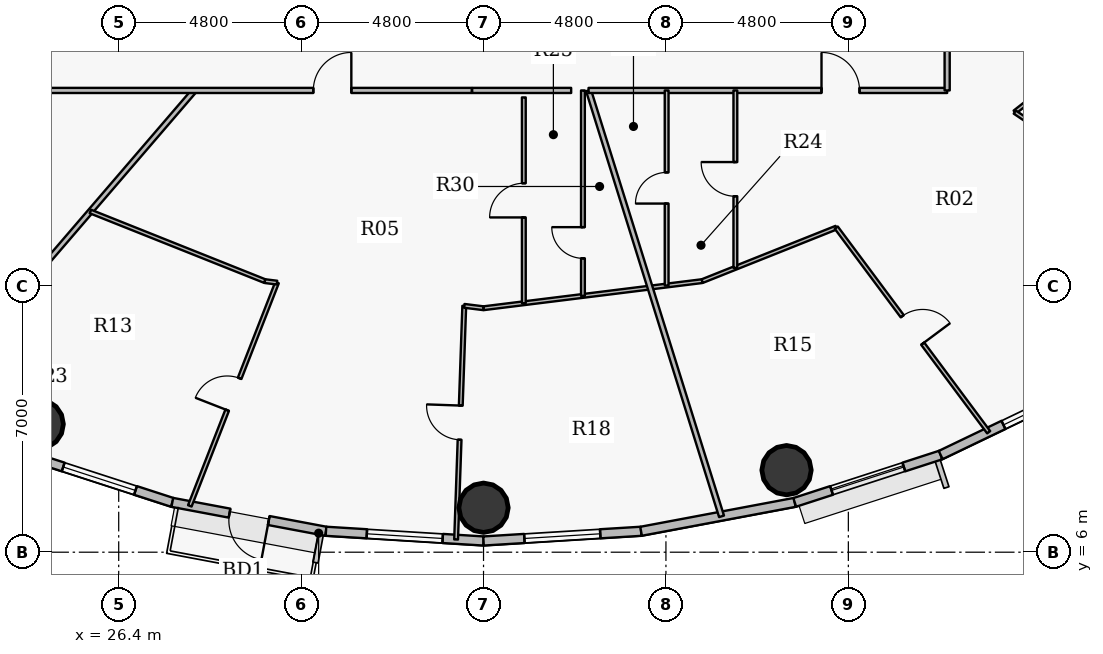
"""IFC4 building model, lengths in metres.
Left out: names, types, materials, properties, quantities, classifications, styles, units other than length and angle.
Written with IfcOpenShell. Run it as: python <this file> out.ifc"""

import sys

from ifc_helpers import new_model, si_unit, direction, frame, frame_2d, origin, origin_2d, place, context, subcontext, project, spatial, rectangle, hollow_circle, extrude, source, transform, mapped, element, fill, save


model = new_model("IFC4")
c1 = context("Model", 3, precision=1e-05, world=origin(), true_north=direction((0.0, 1.0)))
c2 = subcontext(c1, "Body", "Model", "MODEL_VIEW")
j1 = project(units=[si_unit("LENGTHUNIT", "METRE"), si_unit("PLANEANGLEUNIT", "RADIAN")], contexts=[c1])
p1 = place(None, origin())
s1 = spatial("IfcSite", under=j1, at=p1, CompositionType="ELEMENT")
p2 = place(p1, origin())
s2 = spatial("IfcBuilding", under=s1, at=p2, CompositionType="ELEMENT")
p3 = place(p2, frame((0.0, 0.0, 182.4)))
s3 = spatial("IfcBuildingStorey", under=s2, at=p3, CompositionType="ELEMENT", Elevation=182.4)
for number, where, z_axis, x_axis in (
    (1, (24.294, 9.369, 0.0), (0.0, 0.0, 1.0), (1.0, 0.0, 0.0)),
    (2, (36.0, 7.17, 0.0), (0.0, 0.0, 1.0), (1.0, 0.0, 0.0)),
    (3, (43.973, 8.159, 0.0), (0.0, 0.0, 1.0), (1.0, 0.0, 0.0)),
):
    element("IfcColumn", number, at=place(p3, frame(where, z_axis=z_axis, x_axis=x_axis)), inside=s3, PredefinedType="COLUMN", context=c2, shape_type="SweptSolid", body=[
        extrude(hollow_circle(Radius=0.65, WallThickness=0.04, at=origin_2d()), origin(), (0.0, 0.0, 1.0), 3.75),
    ])
p4 = place(p3, frame((27.811, 7.311, 0.0), z_axis=(0.0, 0.0, 1.0), x_axis=(-0.951209870236, 0.30854462038, 0.0)))
e4 = element("IfcWall", 4, at=p4, inside=s3, PredefinedType="SOLIDWALL", context=c2, shape_type="SweptSolid", body=[
    extrude(rectangle(XDim=4.038, YDim=0.24, at=frame_2d((2.019, 0.0))), origin(), (0.0, 0.0, 1.0), 3.5),
])
p5 = place(p4, frame((1.019, 0.0, 0.9)))
e5 = element("IfcOpeningElement", 5, at=p5, cuts=e4, PredefinedType="OPENING", context=c2, shape_type="SweptSolid", body=[
    extrude(rectangle(XDim=2.0, YDim=1.75, at=origin_2d()), frame((1.0, 0.13, 0.875), z_axis=(0.0, -1.0, 0.0), x_axis=(1.0, 0.0, 0.0)), (0.0, 0.0, 1.0), 0.26),
])
p6 = place(p3, frame((31.854, 6.551, 0.0), z_axis=(0.0, 0.0, 1.0), x_axis=(-0.982788108205, 0.184736391573, 0.0)))
e6 = element("IfcWall", 6, at=p6, inside=s3, PredefinedType="SOLIDWALL", context=c2, shape_type="SweptSolid", body=[
    extrude(rectangle(XDim=4.114, YDim=0.24, at=frame_2d((2.057, 0.0))), origin(), (0.0, 0.0, 1.0), 3.5),
])
p7 = place(p6, frame((1.532, 0.0, 0.0)))
e7 = element("IfcOpeningElement", 7, at=p7, cuts=e6, PredefinedType="OPENING", context=c2, shape_type="SweptSolid", body=[
    extrude(rectangle(XDim=1.05, YDim=2.15, at=origin_2d()), frame((0.525, 0.13, 1.075), z_axis=(0.0, -1.0, 0.0), x_axis=(1.0, 0.0, 0.0)), (0.0, 0.0, 1.0), 0.26),
])
p8 = place(p3, frame((36.0, 6.295, 0.0), z_axis=(0.0, 0.0, 1.0), x_axis=(-0.998104600619, 0.061540281305, 0.0)))
e8 = element("IfcWall", 8, at=p8, inside=s3, PredefinedType="SOLIDWALL", context=c2, shape_type="SweptSolid", body=[
    extrude(rectangle(XDim=4.154, YDim=0.24, at=frame_2d((2.077, 0.0))), origin(), (0.0, 0.0, 1.0), 3.5),
])
p9 = place(p8, frame((1.077, 0.0, 0.9)))
e9 = element("IfcOpeningElement", 9, at=p9, cuts=e8, PredefinedType="OPENING", context=c2, shape_type="SweptSolid", body=[
    extrude(rectangle(XDim=2.0, YDim=1.75, at=origin_2d()), frame((1.0, 0.13, 0.875), z_axis=(0.0, -1.0, 0.0), x_axis=(1.0, 0.0, 0.0)), (0.0, 0.0, 1.0), 0.26),
])
p10 = place(p3, frame((40.146, 6.551, 0.0), z_axis=(0.0, 0.0, 1.0), x_axis=(-0.998104600619, -0.061540281305, 0.0)))
e10 = element("IfcWall", 10, at=p10, inside=s3, PredefinedType="SOLIDWALL", context=c2, shape_type="SweptSolid", body=[
    extrude(rectangle(XDim=4.154, YDim=0.24, at=frame_2d((2.077, 0.0))), origin(), (0.0, 0.0, 1.0), 3.5),
])
p11 = place(p10, frame((1.077, 0.0, 0.9)))
e11 = element("IfcOpeningElement", 11, at=p11, cuts=e10, PredefinedType="OPENING", context=c2, shape_type="SweptSolid", body=[
    extrude(rectangle(XDim=2.0, YDim=1.75, at=origin_2d()), frame((1.0, 0.13, 0.875), z_axis=(0.0, -1.0, 0.0), x_axis=(1.0, 0.0, 0.0)), (0.0, 0.0, 1.0), 0.26),
])
p12 = place(p3, frame((44.189, 7.311, 0.0), z_axis=(0.0, 0.0, 1.0), x_axis=(-0.982788108205, -0.184736391573, 0.0)))
e12 = element("IfcWall", 12, at=p12, inside=s3, PredefinedType="SOLIDWALL", context=c2, shape_type="SweptSolid", body=[
    extrude(rectangle(XDim=4.114, YDim=0.24, at=frame_2d((2.057, 0.0))), origin(), (0.0, 0.0, 1.0), 3.5),
])
p13 = place(p3, frame((48.03, 8.556, 0.0), z_axis=(0.0, 0.0, 1.0), x_axis=(-0.951209870236, -0.30854462038, 0.0)))
e13 = element("IfcWall", 13, at=p13, inside=s3, PredefinedType="SOLIDWALL", context=c2, shape_type="SweptSolid", body=[
    extrude(rectangle(XDim=4.038, YDim=0.24, at=frame_2d((2.019, 0.0))), origin(), (0.0, 0.0, 1.0), 3.5),
])
p14 = place(p13, frame((1.019, 0.0, 0.9)))
e14 = element("IfcOpeningElement", 14, at=p14, cuts=e13, PredefinedType="OPENING", context=c2, shape_type="SweptSolid", body=[
    extrude(rectangle(XDim=2.0, YDim=1.75, at=origin_2d()), frame((1.0, 0.13, 0.875), z_axis=(0.0, -1.0, 0.0), x_axis=(1.0, 0.0, 0.0)), (0.0, 0.0, 1.0), 0.26),
])
p15 = place(p3, frame((51.573, 10.257, 0.0), z_axis=(0.0, 0.0, 1.0), x_axis=(-0.901564733809, -0.432644231155, 0.0)))
e15 = element("IfcWall", 15, at=p15, inside=s3, PredefinedType="SOLIDWALL", context=c2, shape_type="SweptSolid", body=[
    extrude(rectangle(XDim=3.93, YDim=0.24, at=frame_2d((1.965, 0.0))), origin(), (0.0, 0.0, 1.0), 3.5),
])
p16 = place(p15, frame((0.848, 0.0, 0.9)))
e16 = element("IfcOpeningElement", 16, at=p16, cuts=e15, PredefinedType="OPENING", context=c2, shape_type="SweptSolid", body=[
    extrude(rectangle(XDim=1.25, YDim=1.65, at=origin_2d()), frame((0.625, 0.13, 0.825), z_axis=(0.0, -1.0, 0.0), x_axis=(1.0, 0.0, 0.0)), (0.0, 0.0, 1.0), 0.26),
])
p17 = place(p3, frame((21.259, 9.852, 0.0), z_axis=(0.0, 0.0, 1.0), x_axis=(0.651889454341, 0.758314011026, 0.0)))
e17 = element("IfcWall", 17, at=p17, inside=s3, PredefinedType="PARTITIONING", context=c2, shape_type="SweptSolid", body=[
    extrude(rectangle(XDim=10.942, YDim=0.135, at=frame_2d((5.471, 0.0))), origin(), (0.0, 0.0, 1.0), 2.935),
])
p18 = place(p3, frame((24.35, 18.15, 0.0), z_axis=(0.0, 0.0, 1.0), x_axis=(1.0, 0.0, 0.0)))
e18 = element("IfcWall", 18, at=p18, inside=s3, PredefinedType="PARTITIONING", context=c2, shape_type="SweptSolid", body=[
    extrude(rectangle(XDim=11.341, YDim=0.135, at=frame_2d((5.67, 0.0))), origin(), (0.0, 0.0, 1.0), 2.935),
])
p19 = place(p18, frame((7.171, 0.0, 0.0)))
e19 = element("IfcOpeningElement", 19, at=p19, cuts=e18, PredefinedType="OPENING", context=c2, shape_type="SweptSolid", body=[
    extrude(rectangle(XDim=1.0, YDim=2.15, at=origin_2d()), frame((0.5, 0.078, 1.075), z_axis=(0.0, -1.0, 0.0), x_axis=(1.0, 0.0, 0.0)), (0.0, 0.0, 1.0), 0.155),
])
p20 = place(p3, frame((25.654, 14.965, 0.0), z_axis=(0.0, 0.0, 1.0), x_axis=(0.928793067963, -0.370598754589, 0.0)))
e20 = element("IfcWall", 20, at=p20, inside=s3, PredefinedType="PARTITIONING", context=c2, shape_type="SweptSolid", body=[
    extrude(rectangle(XDim=4.944, YDim=0.1, at=frame_2d((2.472, 0.0))), origin(), (0.0, 0.0, 1.0), 2.935),
])
p21 = place(p3, frame((28.271, 7.219, 0.0), z_axis=(0.0, 0.0, 1.0), x_axis=(0.363936593544, 0.931423725207, 0.0)))
e21 = element("IfcWall", 21, at=p21, inside=s3, PredefinedType="PARTITIONING", context=c2, shape_type="SweptSolid", body=[
    extrude(rectangle(XDim=6.306, YDim=0.1, at=frame_2d((3.153, 0.0))), origin(), (0.0, 0.0, 1.0), 2.935),
])
p22 = place(p21, frame((2.703, 0.0, 0.0)))
e22 = element("IfcOpeningElement", 22, at=p22, cuts=e21, PredefinedType="OPENING", context=c2, shape_type="SweptSolid", body=[
    extrude(rectangle(XDim=0.9, YDim=2.1, at=origin_2d()), frame((0.45, 0.06, 1.05), z_axis=(0.0, -1.0, 0.0), x_axis=(1.0, 0.0, 0.0)), (0.0, 0.0, 1.0), 0.12),
])
p23 = place(p3, frame((30.246, 13.133, 0.0), z_axis=(0.0, 0.0, 1.0), x_axis=(0.992451589144, -0.122637038475, 0.0)))
e23 = element("IfcWall", 23, at=p23, inside=s3, PredefinedType="PARTITIONING", context=c2, shape_type="SweptSolid", body=[
    extrude(rectangle(XDim=0.323, YDim=0.1, at=frame_2d((0.161, 0.0))), origin(), (0.0, 0.0, 1.0), 3.5),
])
p24 = place(p3, frame((35.278, 6.334, 0.0), z_axis=(0.0, 0.0, 1.0), x_axis=(0.034887406989, 0.999391249128, 0.0)))
e24 = element("IfcWall", 24, at=p24, inside=s3, PredefinedType="PARTITIONING", context=c2, shape_type="SweptSolid", body=[
    extrude(rectangle(XDim=6.151, YDim=0.1, at=frame_2d((3.076, 0.0))), origin(), (0.0, 0.0, 1.0), 2.935),
])
p25 = place(p24, frame((2.625, 0.0, 0.0)))
e25 = element("IfcOpeningElement", 25, at=p25, cuts=e24, PredefinedType="OPENING", context=c2, shape_type="SweptSolid", body=[
    extrude(rectangle(XDim=0.9, YDim=2.1, at=origin_2d()), frame((0.45, 0.06, 1.05), z_axis=(0.0, -1.0, 0.0), x_axis=(1.0, 0.0, 0.0)), (0.0, 0.0, 1.0), 0.12),
])
p26 = place(p3, frame((35.493, 12.482, 0.0), z_axis=(0.0, 0.0, 1.0), x_axis=(0.992373140554, -0.123270231229, 0.0)))
e26 = element("IfcWall", 26, at=p26, inside=s3, PredefinedType="PARTITIONING", context=c2, shape_type="SweptSolid", body=[
    extrude(rectangle(XDim=0.511, YDim=0.1, at=frame_2d((0.255, 0.0))), origin(), (0.0, 0.0, 1.0), 2.935),
])
p27 = place(p3, frame((36.0, 12.419, 0.0), z_axis=(0.0, 0.0, 1.0), x_axis=(0.992396615981, 0.123081097612, 0.0)))
e27 = element("IfcWall", 27, at=p27, inside=s3, PredefinedType="PARTITIONING", context=c2, shape_type="SweptSolid", body=[
    extrude(rectangle(XDim=5.798, YDim=0.1, at=frame_2d((2.899, 0.0))), origin(), (0.0, 0.0, 1.0), 2.935),
])
p28 = place(p3, frame((37.061, 12.551, 0.0), z_axis=(0.0, 0.0, 1.0), x_axis=(0.0, 1.0, 0.0)))
e28 = element("IfcWall", 28, at=p28, inside=s3, PredefinedType="PARTITIONING", context=c2, shape_type="SweptSolid", body=[
    extrude(rectangle(XDim=5.416, YDim=0.1, at=frame_2d((2.708, 0.0))), origin(), (0.0, 0.0, 1.0), 3.085),
])
p29 = place(p28, frame((2.258, 0.0, 0.0)))
e29 = element("IfcOpeningElement", 29, at=p29, cuts=e28, PredefinedType="OPENING", context=c2, shape_type="SweptSolid", body=[
    extrude(rectangle(XDim=0.9, YDim=2.1, at=origin_2d()), frame((0.45, 0.06, 1.05), z_axis=(0.0, -1.0, 0.0), x_axis=(1.0, 0.0, 0.0)), (0.0, 0.0, 1.0), 0.12),
])
p30 = place(p3, frame((38.616, 12.743, 0.0), z_axis=(0.0, 0.0, 1.0), x_axis=(0.0, 1.0, 0.0)))
e30 = element("IfcWall", 30, at=p30, inside=s3, PredefinedType="PARTITIONING", context=c2, shape_type="SweptSolid", body=[
    extrude(rectangle(XDim=5.406, YDim=0.1, at=frame_2d((2.703, 0.0))), origin(), (0.0, 0.0, 1.0), 3.085),
])
p31 = place(p30, frame((0.989, 0.0, 0.0)))
e31 = element("IfcOpeningElement", 31, at=p31, cuts=e30, PredefinedType="OPENING", context=c2, shape_type="SweptSolid", body=[
    extrude(rectangle(XDim=0.82, YDim=2.1, at=origin_2d()), frame((0.41, 0.06, 1.05), z_axis=(0.0, -1.0, 0.0), x_axis=(1.0, 0.0, 0.0)), (0.0, 0.0, 1.0), 0.12),
])
p32 = place(p3, frame((38.764, 18.15, 0.0), z_axis=(0.0, 0.0, 1.0), x_axis=(0.298084348379, -0.954539533624, 0.0)))
e32 = element("IfcWall", 32, at=p32, inside=s3, PredefinedType="PARTITIONING", context=c2, shape_type="SweptSolid", body=[
    extrude(rectangle(XDim=11.74, YDim=0.135, at=frame_2d((5.87, 0.0))), origin(), (0.0, 0.0, 1.0), 2.935),
])
p33 = place(p3, frame((38.764, 18.15, 0.0), z_axis=(0.0, 0.0, 1.0), x_axis=(1.0, 0.0, 0.0)))
e33 = element("IfcWall", 33, at=p33, inside=s3, PredefinedType="PARTITIONING", context=c2, shape_type="SweptSolid", body=[
    extrude(rectangle(XDim=9.436, YDim=0.135, at=frame_2d((4.718, 0.0))), origin(), (0.0, 0.0, 1.0), 2.935),
])
p34 = place(p33, frame((6.13, 0.0, 0.0)))
e34 = element("IfcOpeningElement", 34, at=p34, cuts=e33, PredefinedType="OPENING", context=c2, shape_type="SweptSolid", body=[
    extrude(rectangle(XDim=1.0, YDim=2.15, at=origin_2d()), frame((0.5, 0.078, 1.075), z_axis=(0.0, -1.0, 0.0), x_axis=(1.0, 0.0, 0.0)), (0.0, 0.0, 1.0), 0.155),
])
p35 = place(p3, frame((40.819, 13.017, 0.0), z_axis=(0.0, 0.0, 1.0), x_axis=(0.0, 1.0, 0.0)))
e35 = element("IfcWall", 35, at=p35, inside=s3, PredefinedType="PARTITIONING", context=c2, shape_type="SweptSolid", body=[
    extrude(rectangle(XDim=5.133, YDim=0.1, at=frame_2d((2.567, 0.0))), origin(), (0.0, 0.0, 1.0), 2.935),
])
p36 = place(p35, frame((2.157, 0.0, 0.0)))
e36 = element("IfcOpeningElement", 36, at=p36, cuts=e35, PredefinedType="OPENING", context=c2, shape_type="SweptSolid", body=[
    extrude(rectangle(XDim=0.82, YDim=2.1, at=origin_2d()), frame((0.41, 0.06, 1.05), z_axis=(0.0, -1.0, 0.0), x_axis=(1.0, 0.0, 0.0)), (0.0, 0.0, 1.0), 0.12),
])
p37 = place(p3, frame((41.754, 13.133, 0.0), z_axis=(0.0, 0.0, 1.0), x_axis=(0.928786664236, 0.370614803182, 0.0)))
e37 = element("IfcWall", 37, at=p37, inside=s3, PredefinedType="PARTITIONING", context=c2, shape_type="SweptSolid", body=[
    extrude(rectangle(XDim=3.798, YDim=0.1, at=frame_2d((1.899, 0.0))), origin(), (0.0, 0.0, 1.0), 2.935),
])
p38 = place(p3, frame((42.627, 13.481, 0.0), z_axis=(0.0, 0.0, 1.0), x_axis=(0.0, 1.0, 0.0)))
e38 = element("IfcWall", 38, at=p38, inside=s3, PredefinedType="PARTITIONING", context=c2, shape_type="SweptSolid", body=[
    extrude(rectangle(XDim=4.669, YDim=0.1, at=frame_2d((2.334, 0.0))), origin(), (0.0, 0.0, 1.0), 3.5),
])
p39 = place(p38, frame((1.885, 0.0, 0.0)))
e39 = element("IfcOpeningElement", 39, at=p39, cuts=e38, PredefinedType="OPENING", context=c2, shape_type="SweptSolid", body=[
    extrude(rectangle(XDim=0.9, YDim=2.1, at=origin_2d()), frame((0.45, 0.06, 1.05), z_axis=(0.0, -1.0, 0.0), x_axis=(1.0, 0.0, 0.0)), (0.0, 0.0, 1.0), 0.12),
])
p40 = place(p3, frame((45.282, 14.54, 0.0), z_axis=(0.0, 0.0, 1.0), x_axis=(0.597407497301, -0.801937829366, 0.0)))
e40 = element("IfcWall", 40, at=p40, inside=s3, PredefinedType="PARTITIONING", context=c2, shape_type="SweptSolid", body=[
    extrude(rectangle(XDim=6.713, YDim=0.1, at=frame_2d((3.356, 0.0))), origin(), (0.0, 0.0, 1.0), 2.935),
])
p41 = place(p40, frame((2.906, 0.0, 0.0)))
e41 = element("IfcOpeningElement", 41, at=p41, cuts=e40, PredefinedType="OPENING", context=c2, shape_type="SweptSolid", body=[
    extrude(rectangle(XDim=0.9, YDim=2.1, at=origin_2d()), frame((0.45, 0.06, 1.05), z_axis=(0.0, -1.0, 0.0), x_axis=(1.0, 0.0, 0.0)), (0.0, 0.0, 1.0), 0.12),
])
p42 = place(p3, frame((48.2, 18.15, 0.0), z_axis=(0.0, 0.0, 1.0), x_axis=(0.0, 1.0, 0.0)))
e42 = element("IfcWall", 42, at=p42, inside=s3, PredefinedType="PARTITIONING", context=c2, shape_type="SweptSolid", body=[
    extrude(rectangle(XDim=1.9, YDim=0.135, at=frame_2d((0.95, 0.0))), origin(), (0.0, 0.0, 1.0), 3.5),
])
p43 = place(p3, frame((49.979, 17.58, 0.0), z_axis=(0.0, 0.0, 1.0), x_axis=(0.787344176355, 0.6165137046, 0.0)))
e43 = element("IfcWall", 43, at=p43, inside=s3, PredefinedType="PARTITIONING", context=c2, shape_type="SweptSolid", body=[
    extrude(rectangle(XDim=1.378, YDim=0.1, at=frame_2d((0.689, 0.0))), origin(), (0.0, 0.0, 1.0), 3.5),
])
p44 = place(p3, frame((49.979, 17.58, 0.0), z_axis=(0.0, 0.0, 1.0), x_axis=(0.829313188428, -0.55878406876, 0.0)))
e44 = element("IfcWall", 44, at=p44, inside=s3, PredefinedType="PARTITIONING", context=c2, shape_type="SweptSolid", body=[
    extrude(rectangle(XDim=7.259, YDim=0.1, at=frame_2d((3.629, 0.0))), origin(), (0.0, 0.0, 1.0), 2.935),
])
p45 = place(p44, frame((3.179, 0.0, 0.0)))
e45 = element("IfcOpeningElement", 45, at=p45, cuts=e44, PredefinedType="OPENING", context=c2, shape_type="SweptSolid", body=[
    extrude(rectangle(XDim=0.9, YDim=2.1, at=origin_2d()), frame((0.45, 0.06, 1.05), z_axis=(0.0, -1.0, 0.0), x_axis=(1.0, 0.0, 0.0)), (0.0, 0.0, 1.0), 0.12),
])
p46 = place(p3, frame((38.306, 18.15, 0.0), z_axis=(0.0, 0.0, 1.0), x_axis=(-1.0, 0.0, 0.0)))
e46 = element("IfcWall", 46, at=p46, inside=s3, PredefinedType="PARTITIONING", context=c2, shape_type="SweptSolid", body=[
    extrude(rectangle(XDim=2.605, YDim=0.135, at=frame_2d((1.302, 0.0))), origin(), (0.0, 0.0, 1.0), 2.935),
])
m1 = source(origin(), c2, "Body", "SweptSolid", [
    extrude(rectangle(XDim=2.0, YDim=1.75, at=origin_2d()), frame((1.0, 0.03, 0.875), z_axis=(0.0, -1.0, 0.0), x_axis=(1.0, 0.0, 0.0)), (0.0, 0.0, 1.0), 0.06),
])
p47 = place(p5, origin())
e47 = element("IfcWindow", 47, at=p47, inside=s3, PartitioningType="DOUBLE_PANEL_VERTICAL", PredefinedType="WINDOW", context=c2, shape_type="MappedRepresentation", body=[
    mapped(m1, transform((0.0, 0.0, 0.0), x_axis=(1.0, 0.0, 0.0), y_axis=(0.0, 1.0, 0.0), z_axis=(0.0, 0.0, 1.0), scale=1.0)),
])
fill(e5, e47)
m2 = source(origin(), c2, "Body", "SweptSolid", [
    extrude(rectangle(XDim=1.05, YDim=2.15, at=origin_2d()), frame((0.525, 0.025, 1.075), z_axis=(0.0, -1.0, 0.0), x_axis=(1.0, 0.0, 0.0)), (0.0, 0.0, 1.0), 0.05),
])
p48 = place(p7, origin())
e48 = element("IfcDoor", 48, at=p48, inside=s3, OperationType="SINGLE_SWING_LEFT", PredefinedType="DOOR", context=c2, shape_type="MappedRepresentation", body=[
    mapped(m2, transform((0.0, 0.0, 0.0), x_axis=(1.0, 0.0, 0.0), y_axis=(0.0, 1.0, 0.0), z_axis=(0.0, 0.0, 1.0), scale=1.0)),
])
fill(e7, e48)
p49 = place(p9, origin())
e49 = element("IfcWindow", 49, at=p49, inside=s3, PartitioningType="DOUBLE_PANEL_VERTICAL", PredefinedType="WINDOW", context=c2, shape_type="MappedRepresentation", body=[
    mapped(m1, transform((0.0, 0.0, 0.0), x_axis=(1.0, 0.0, 0.0), y_axis=(0.0, 1.0, 0.0), z_axis=(0.0, 0.0, 1.0), scale=1.0)),
])
fill(e9, e49)
p50 = place(p11, origin())
e50 = element("IfcWindow", 50, at=p50, inside=s3, PartitioningType="DOUBLE_PANEL_VERTICAL", PredefinedType="WINDOW", context=c2, shape_type="MappedRepresentation", body=[
    mapped(m1, transform((0.0, 0.0, 0.0), x_axis=(1.0, 0.0, 0.0), y_axis=(0.0, 1.0, 0.0), z_axis=(0.0, 0.0, 1.0), scale=1.0)),
])
fill(e11, e50)
p51 = place(p14, origin())
e51 = element("IfcWindow", 51, at=p51, inside=s3, PartitioningType="DOUBLE_PANEL_VERTICAL", PredefinedType="WINDOW", context=c2, shape_type="MappedRepresentation", body=[
    mapped(m1, transform((0.0, 0.0, 0.0), x_axis=(1.0, 0.0, 0.0), y_axis=(0.0, 1.0, 0.0), z_axis=(0.0, 0.0, 1.0), scale=1.0)),
])
fill(e14, e51)
m3 = source(origin(), c2, "Body", "SweptSolid", [
    extrude(rectangle(XDim=1.25, YDim=1.65, at=origin_2d()), frame((0.625, 0.03, 0.825), z_axis=(0.0, -1.0, 0.0), x_axis=(1.0, 0.0, 0.0)), (0.0, 0.0, 1.0), 0.06),
])
p52 = place(p16, origin())
e52 = element("IfcWindow", 52, at=p52, inside=s3, PartitioningType="SINGLE_PANEL", PredefinedType="WINDOW", context=c2, shape_type="MappedRepresentation", body=[
    mapped(m3, transform((0.0, 0.0, 0.0), x_axis=(1.0, 0.0, 0.0), y_axis=(0.0, 1.0, 0.0), z_axis=(0.0, 0.0, 1.0), scale=1.0)),
])
fill(e16, e52)
m4 = source(origin(), c2, "Body", "SweptSolid", [
    extrude(rectangle(XDim=1.0, YDim=2.15, at=origin_2d()), frame((0.5, 0.025, 1.075), z_axis=(0.0, -1.0, 0.0), x_axis=(1.0, 0.0, 0.0)), (0.0, 0.0, 1.0), 0.05),
])
p53 = place(p19, origin())
e53 = element("IfcDoor", 53, at=p53, inside=s3, OperationType="SINGLE_SWING_RIGHT", PredefinedType="DOOR", context=c2, shape_type="MappedRepresentation", body=[
    mapped(m4, transform((0.0, 0.0, 0.0), x_axis=(1.0, 0.0, 0.0), y_axis=(0.0, 1.0, 0.0), z_axis=(0.0, 0.0, 1.0), scale=1.0)),
])
fill(e19, e53)
m5 = source(origin(), c2, "Body", "SweptSolid", [
    extrude(rectangle(XDim=0.9, YDim=2.1, at=origin_2d()), frame((0.45, 0.025, 1.05), z_axis=(0.0, -1.0, 0.0), x_axis=(1.0, 0.0, 0.0)), (0.0, 0.0, 1.0), 0.05),
])
p54 = place(p22, origin())
e54 = element("IfcDoor", 54, at=p54, inside=s3, OperationType="SINGLE_SWING_LEFT", PredefinedType="DOOR", context=c2, shape_type="MappedRepresentation", body=[
    mapped(m5, transform((0.0, 0.0, 0.0), x_axis=(1.0, 0.0, 0.0), y_axis=(0.0, 1.0, 0.0), z_axis=(0.0, 0.0, 1.0), scale=1.0)),
])
fill(e22, e54)
p55 = place(p25, origin())
e55 = element("IfcDoor", 55, at=p55, inside=s3, OperationType="SINGLE_SWING_RIGHT", PredefinedType="DOOR", context=c2, shape_type="MappedRepresentation", body=[
    mapped(m5, transform((0.0, 0.0, 0.0), x_axis=(1.0, 0.0, 0.0), y_axis=(0.0, 1.0, 0.0), z_axis=(0.0, 0.0, 1.0), scale=1.0)),
])
fill(e25, e55)
p56 = place(p29, origin())
e56 = element("IfcDoor", 56, at=p56, inside=s3, OperationType="SINGLE_SWING_LEFT", PredefinedType="DOOR", context=c2, shape_type="MappedRepresentation", body=[
    mapped(m5, transform((0.0, 0.0, 0.0), x_axis=(1.0, 0.0, 0.0), y_axis=(0.0, 1.0, 0.0), z_axis=(0.0, 0.0, 1.0), scale=1.0)),
])
fill(e29, e56)
m6 = source(origin(), c2, "Body", "SweptSolid", [
    extrude(rectangle(XDim=0.82, YDim=2.1, at=origin_2d()), frame((0.41, 0.025, 1.05), z_axis=(0.0, -1.0, 0.0), x_axis=(1.0, 0.0, 0.0)), (0.0, 0.0, 1.0), 0.05),
])
p57 = place(p31, origin())
e57 = element("IfcDoor", 57, at=p57, inside=s3, OperationType="SINGLE_SWING_RIGHT", PredefinedType="DOOR", context=c2, shape_type="MappedRepresentation", body=[
    mapped(m6, transform((0.0, 0.0, 0.0), x_axis=(1.0, 0.0, 0.0), y_axis=(0.0, 1.0, 0.0), z_axis=(0.0, 0.0, 1.0), scale=1.0)),
])
fill(e31, e57)
p58 = place(p34, origin())
e58 = element("IfcDoor", 58, at=p58, inside=s3, OperationType="SINGLE_SWING_LEFT", PredefinedType="DOOR", context=c2, shape_type="MappedRepresentation", body=[
    mapped(m4, transform((0.0, 0.0, 0.0), x_axis=(1.0, 0.0, 0.0), y_axis=(0.0, 1.0, 0.0), z_axis=(0.0, 0.0, 1.0), scale=1.0)),
])
fill(e34, e58)
p59 = place(p41, origin())
e59 = element("IfcDoor", 59, at=p59, inside=s3, OperationType="SINGLE_SWING_RIGHT", PredefinedType="DOOR", context=c2, shape_type="MappedRepresentation", body=[
    mapped(m5, transform((0.0, 0.0, 0.0), x_axis=(1.0, 0.0, 0.0), y_axis=(0.0, 1.0, 0.0), z_axis=(0.0, 0.0, 1.0), scale=1.0)),
])
fill(e41, e59)
p60 = place(p39, origin())
e60 = element("IfcDoor", 60, at=p60, inside=s3, OperationType="SINGLE_SWING_RIGHT", PredefinedType="DOOR", context=c2, shape_type="MappedRepresentation", body=[
    mapped(m5, transform((0.0, 0.0, 0.0), x_axis=(1.0, 0.0, 0.0), y_axis=(0.0, 1.0, 0.0), z_axis=(0.0, 0.0, 1.0), scale=1.0)),
])
fill(e39, e60)
p61 = place(p36, origin())
e61 = element("IfcDoor", 61, at=p61, inside=s3, OperationType="SINGLE_SWING_LEFT", PredefinedType="DOOR", context=c2, shape_type="MappedRepresentation", body=[
    mapped(m6, transform((0.0, 0.0, 0.0), x_axis=(1.0, 0.0, 0.0), y_axis=(0.0, 1.0, 0.0), z_axis=(0.0, 0.0, 1.0), scale=1.0)),
])
fill(e36, e61)
save(model, sys.argv[1])
